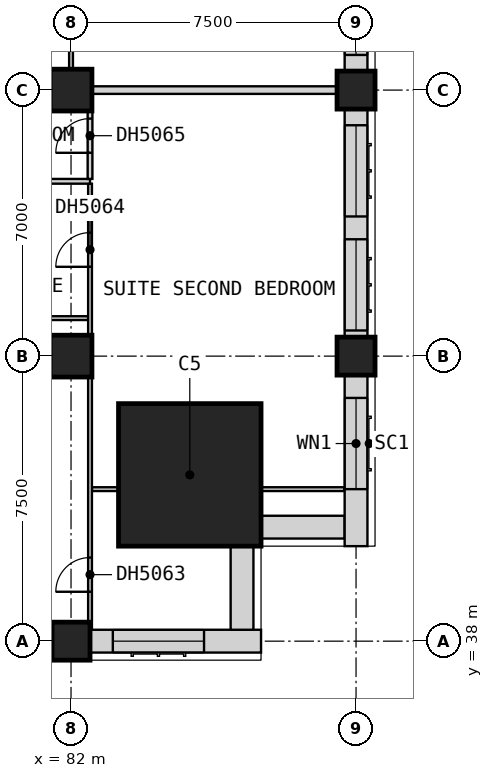
"""IFC4 building model, lengths in metres.
Left out: names, types, materials, properties, quantities, classifications, styles, units other than length and angle.
Written with IfcOpenShell. Run it as: python <this file> out.ifc"""

import sys

from ifc_helpers import new_model, si_unit, direction, frame, frame_2d, origin, origin_2d, place, context, subcontext, project, spatial, rectangle, extrude, element, fill, save


model = new_model("IFC4")
c1 = context("Model", 3, precision=1e-05, world=origin(), true_north=direction((0.0, 1.0)))
c2 = subcontext(c1, "Body", "Model", "MODEL_VIEW")
j1 = project(units=[si_unit("LENGTHUNIT", "METRE"), si_unit("PLANEANGLEUNIT", "RADIAN")], contexts=[c1])
p1 = place(None, origin())
s1 = spatial("IfcSite", under=j1, at=p1, CompositionType="ELEMENT")
p2 = place(p1, origin())
s2 = spatial("IfcBuilding", under=s1, at=p2, CompositionType="ELEMENT")
p3 = place(p2, frame((0.0, 0.0, 93.5)))
s3 = spatial("IfcBuildingStorey", under=s2, at=p3, CompositionType="ELEMENT", Elevation=93.5)
p4 = place(p3, frame((82.0, 38.0, 0.0), z_axis=(0.0, 0.0, 1.0), x_axis=(1.0, 0.0, 0.0)))
e1 = element("IfcColumn", 1, at=p4, inside=s3, PredefinedType="COLUMN", context=c2, shape_type="SweptSolid", body=[
    extrude(rectangle(XDim=1.0, YDim=1.0, at=origin_2d()), origin(), (0.0, 0.0, 1.0), 3.6),
])
for number, where, z_axis, x_axis in (
    (2, (82.0, 45.5, 0.0), (0.0, 0.0, 1.0), (1.0, 0.0, 0.0)),
    (3, (82.0, 52.5, 0.0), (0.0, 0.0, 1.0), (1.0, 0.0, 0.0)),
):
    element("IfcColumn", number, at=place(p3, frame(where, z_axis=z_axis, x_axis=x_axis)), inside=s3, PredefinedType="COLUMN", context=c2, shape_type="SweptSolid", body=[
        extrude(rectangle(XDim=1.1, YDim=1.1, at=origin_2d()), origin(), (0.0, 0.0, 1.0), 3.6),
    ])
for number, where, z_axis, x_axis in (
    (4, (89.5, 45.5, 0.0), (0.0, 0.0, 1.0), (1.0, 0.0, 0.0)),
    (5, (89.5, 52.5, 0.0), (0.0, 0.0, 1.0), (1.0, 0.0, 0.0)),
):
    element("IfcColumn", number, at=place(p3, frame(where, z_axis=z_axis, x_axis=x_axis)), inside=s3, PredefinedType="COLUMN", context=c2, shape_type="SweptSolid", body=[
        extrude(rectangle(XDim=1.0, YDim=1.0, at=origin_2d()), origin(), (0.0, 0.0, 1.0), 3.6),
    ])
p5 = place(p3, frame((85.125, 42.375, 0.0), z_axis=(0.0, 0.0, 1.0), x_axis=(1.0, 0.0, 0.0)))
e6 = element("IfcColumn", 6, at=p5, inside=s3, PredefinedType="COLUMN", context=c2, shape_type="SweptSolid", body=[
    extrude(rectangle(XDim=3.75, YDim=3.75, at=origin_2d()), origin(), (0.0, 0.0, 1.0), 3.6),
])
p6 = place(p3, frame((82.5, 38.0, 0.0), z_axis=(0.0, 0.0, 1.0), x_axis=(1.0, 0.0, 0.0)))
e7 = element("IfcWall", 7, at=p6, inside=s3, PredefinedType="SOLIDWALL", context=c2, shape_type="SweptSolid", body=[
    extrude(rectangle(XDim=4.5, YDim=0.6, at=frame_2d((2.25, 0.0))), origin(), (0.0, 0.0, 1.0), 2.85),
])
p7 = place(p6, frame((0.6, 0.0, 0.8)))
e8 = element("IfcOpeningElement", 8, at=p7, cuts=e7, PredefinedType="OPENING", context=c2, shape_type="SweptSolid", body=[
    extrude(rectangle(XDim=2.4, YDim=1.8, at=frame_2d((1.2, 0.9))), frame((0.0, 0.31, 0.0), z_axis=(0.0, -1.0, 0.0), x_axis=(1.0, 0.0, 0.0)), (0.0, 0.0, 1.0), 0.62),
])
for number, where, z_axis, x_axis in (
    (9, (86.5, 38.3, 0.0), (0.0, 0.0, 1.0), (0.0, 1.0, 0.0)),
    (10, (87.0, 41.0, 0.0), (0.0, 0.0, 1.0), (1.0, 0.0, 0.0)),
):
    element("IfcWall", number, at=place(p3, frame(where, z_axis=z_axis, x_axis=x_axis)), inside=s3, PredefinedType="SOLIDWALL", context=c2, shape_type="SweptSolid", body=[
        extrude(rectangle(XDim=2.2, YDim=0.6, at=frame_2d((1.1, 0.0))), origin(), (0.0, 0.0, 1.0), 3.35),
    ])
p8 = place(p3, frame((89.5, 40.5, 0.0), z_axis=(0.0, 0.0, 1.0), x_axis=(0.0, 1.0, 0.0)))
e11 = element("IfcWall", 11, at=p8, inside=s3, PredefinedType="SOLIDWALL", context=c2, shape_type="SweptSolid", body=[
    extrude(rectangle(XDim=4.5, YDim=0.6, at=frame_2d((2.25, 0.0))), origin(), (0.0, 0.0, 1.0), 2.85),
])
p9 = place(p8, frame((1.5, 0.0, 0.8)))
e12 = element("IfcOpeningElement", 12, at=p9, cuts=e11, PredefinedType="OPENING", context=c2, shape_type="SweptSolid", body=[
    extrude(rectangle(XDim=2.4, YDim=1.8, at=frame_2d((1.2, 0.9))), frame((0.0, 0.31, 0.0), z_axis=(0.0, -1.0, 0.0), x_axis=(1.0, 0.0, 0.0)), (0.0, 0.0, 1.0), 0.62),
])
p10 = place(p3, frame((89.5, 46.0, 0.0), z_axis=(0.0, 0.0, 1.0), x_axis=(0.0, 1.0, 0.0)))
e13 = element("IfcWall", 13, at=p10, inside=s3, PredefinedType="SOLIDWALL", context=c2, shape_type="SweptSolid", body=[
    extrude(rectangle(XDim=6.0, YDim=0.6, at=frame_2d((3.0, 0.0))), origin(), (0.0, 0.0, 1.0), 2.85),
])
p11 = place(p10, frame((0.175, 0.0, 0.8)))
e14 = element("IfcOpeningElement", 14, at=p11, cuts=e13, PredefinedType="OPENING", context=c2, shape_type="SweptSolid", body=[
    extrude(rectangle(XDim=2.4, YDim=1.8, at=frame_2d((1.2, 0.9))), frame((0.0, 0.31, 0.0), z_axis=(0.0, -1.0, 0.0), x_axis=(1.0, 0.0, 0.0)), (0.0, 0.0, 1.0), 0.62),
])
p12 = place(p10, frame((3.175, 0.0, 0.8)))
e15 = element("IfcOpeningElement", 15, at=p12, cuts=e13, PredefinedType="OPENING", context=c2, shape_type="SweptSolid", body=[
    extrude(rectangle(XDim=2.4, YDim=1.8, at=frame_2d((1.2, 0.9))), frame((0.0, 0.31, 0.0), z_axis=(0.0, -1.0, 0.0), x_axis=(1.0, 0.0, 0.0)), (0.0, 0.0, 1.0), 0.62),
])
p13 = place(p3, frame((89.5, 53.0, 0.0), z_axis=(0.0, 0.0, 1.0), x_axis=(0.0, 1.0, 0.0)))
e16 = element("IfcWall", 16, at=p13, inside=s3, PredefinedType="SOLIDWALL", context=c2, shape_type="SweptSolid", body=[
    extrude(rectangle(XDim=6.5, YDim=0.6, at=frame_2d((3.25, 0.0))), origin(), (0.0, 0.0, 1.0), 2.85),
])
p14 = place(p13, frame((0.425, 0.0, 0.8)))
e17 = element("IfcOpeningElement", 17, at=p14, cuts=e16, PredefinedType="OPENING", context=c2, shape_type="SweptSolid", body=[
    extrude(rectangle(XDim=2.4, YDim=1.8, at=frame_2d((1.2, 0.9))), frame((0.0, 0.31, 0.0), z_axis=(0.0, -1.0, 0.0), x_axis=(1.0, 0.0, 0.0)), (0.0, 0.0, 1.0), 0.62),
])
p15 = place(p13, frame((3.675, 0.0, 0.8)))
e18 = element("IfcOpeningElement", 18, at=p15, cuts=e16, PredefinedType="OPENING", context=c2, shape_type="SweptSolid", body=[
    extrude(rectangle(XDim=2.4, YDim=1.8, at=frame_2d((1.2, 0.9))), frame((0.0, 0.31, 0.0), z_axis=(0.0, -1.0, 0.0), x_axis=(1.0, 0.0, 0.0)), (0.0, 0.0, 1.0), 0.62),
])
p16 = place(p3, frame((77.475, 52.5, 0.0), z_axis=(0.0, 0.0, 1.0), x_axis=(1.0, 0.0, 0.0)))
e19 = element("IfcWall", 19, at=p16, inside=s3, PredefinedType="PARTITIONING", context=c2, shape_type="SweptSolid", body=[
    extrude(rectangle(XDim=12.525, YDim=0.2, at=frame_2d((6.262, 0.0))), origin(), (0.0, 0.0, 1.0), 3.35),
])
p17 = place(p3, frame((82.55, 42.0, 0.0), z_axis=(0.0, 0.0, 1.0), x_axis=(1.0, 0.0, 0.0)))
e20 = element("IfcWall", 20, at=p17, inside=s3, PredefinedType="PARTITIONING", context=c2, shape_type="SweptSolid", body=[
    extrude(rectangle(XDim=6.64, YDim=0.1, at=frame_2d((3.32, 0.0))), origin(), (0.0, 0.0, 1.0), 3.35),
])
p18 = place(p3, frame((75.1, 46.5, 0.0), z_axis=(0.0, 0.0, 1.0), x_axis=(1.0, 0.0, 0.0)))
e21 = element("IfcWall", 21, at=p18, inside=s3, PredefinedType="PARTITIONING", context=c2, shape_type="SweptSolid", body=[
    extrude(rectangle(XDim=7.35, YDim=0.1, at=frame_2d((3.675, 0.0))), origin(), (0.0, 0.0, 1.0), 3.35),
])
p19 = place(p18, frame((0.65, 0.0, 0.0)))
e22 = element("IfcOpeningElement", 22, at=p19, cuts=e21, PredefinedType="OPENING", context=c2, shape_type="SweptSolid", body=[
    extrude(rectangle(XDim=0.9, YDim=2.1, at=frame_2d((0.45, 1.05))), frame((0.0, 0.06, 0.0), z_axis=(0.0, -1.0, 0.0), x_axis=(1.0, 0.0, 0.0)), (0.0, 0.0, 1.0), 0.12),
])
p20 = place(p3, frame((82.0, 52.6, 0.0), z_axis=(0.0, 0.0, 1.0), x_axis=(0.0, 1.0, 0.0)))
e23 = element("IfcWall", 23, at=p20, inside=s3, PredefinedType="PARTITIONING", context=c2, shape_type="SweptSolid", body=[
    extrude(rectangle(XDim=4.337, YDim=0.1, at=frame_2d((2.169, 0.0))), origin(), (0.0, 0.0, 1.0), 3.35),
])
p21 = place(p20, frame((1.7, 0.0, 0.0)))
e24 = element("IfcOpeningElement", 24, at=p21, cuts=e23, PredefinedType="OPENING", context=c2, shape_type="SweptSolid", body=[
    extrude(rectangle(XDim=0.9, YDim=2.1, at=frame_2d((0.45, 1.05))), frame((0.0, 0.06, 0.0), z_axis=(0.0, -1.0, 0.0), x_axis=(1.0, 0.0, 0.0)), (0.0, 0.0, 1.0), 0.12),
])
p22 = place(p3, frame((82.5, 38.31, 0.0), z_axis=(0.0, 0.0, 1.0), x_axis=(0.0, 1.0, 0.0)))
e25 = element("IfcWall", 25, at=p22, inside=s3, PredefinedType="PARTITIONING", context=c2, shape_type="SweptSolid", body=[
    extrude(rectangle(XDim=11.728, YDim=0.1, at=frame_2d((5.864, 0.0))), origin(), (0.0, 0.0, 1.0), 3.35),
])
p23 = place(p22, frame((0.99, 0.0, 0.0)))
e26 = element("IfcOpeningElement", 26, at=p23, cuts=e25, PredefinedType="OPENING", context=c2, shape_type="SweptSolid", body=[
    extrude(rectangle(XDim=0.9, YDim=2.1, at=frame_2d((0.45, 1.05))), frame((0.0, 0.06, 0.0), z_axis=(0.0, -1.0, 0.0), x_axis=(1.0, 0.0, 0.0)), (0.0, 0.0, 1.0), 0.12),
])
p24 = place(p22, frame((9.54, 0.0, 0.0)))
e27 = element("IfcOpeningElement", 27, at=p24, cuts=e25, PredefinedType="OPENING", context=c2, shape_type="SweptSolid", body=[
    extrude(rectangle(XDim=0.9, YDim=2.1, at=frame_2d((0.45, 1.05))), frame((0.0, 0.06, 0.0), z_axis=(0.0, -1.0, 0.0), x_axis=(1.0, 0.0, 0.0)), (0.0, 0.0, 1.0), 0.12),
])
p25 = place(p3, frame((77.475, 50.1, 0.0), z_axis=(0.0, 0.0, 1.0), x_axis=(1.0, 0.0, 0.0)))
e28 = element("IfcWall", 28, at=p25, inside=s3, PredefinedType="PARTITIONING", context=c2, shape_type="SweptSolid", body=[
    extrude(rectangle(XDim=5.025, YDim=0.125, at=frame_2d((2.512, 0.0))), origin(), (0.0, 0.0, 1.0), 3.35),
])
p26 = place(p3, frame((82.5, 50.163, 0.0), z_axis=(0.0, 0.0, 1.0), x_axis=(0.0, 1.0, 0.0)))
e29 = element("IfcWall", 29, at=p26, inside=s3, PredefinedType="PARTITIONING", context=c2, shape_type="SweptSolid", body=[
    extrude(rectangle(XDim=2.237, YDim=0.125, at=frame_2d((1.119, 0.0))), origin(), (0.0, 0.0, 1.0), 3.35),
])
p27 = place(p26, frame((0.688, 0.0, 0.0)))
e30 = element("IfcOpeningElement", 30, at=p27, cuts=e29, PredefinedType="OPENING", context=c2, shape_type="SweptSolid", body=[
    extrude(rectangle(XDim=0.9, YDim=2.1, at=frame_2d((0.45, 1.05))), frame((0.0, 0.073, 0.0), z_axis=(0.0, -1.0, 0.0), x_axis=(1.0, 0.0, 0.0)), (0.0, 0.0, 1.0), 0.145),
])
p28 = place(p7, origin())
e31 = element("IfcWindow", 31, at=p28, inside=s3, PartitioningType="SINGLE_PANEL", PredefinedType="WINDOW", context=c2, shape_type="SweptSolid", body=[
    extrude(rectangle(XDim=2.4, YDim=1.8, at=frame_2d((1.2, 0.9))), frame((0.0, -0.07, 0.0), z_axis=(0.0, -1.0, 0.0), x_axis=(1.0, 0.0, 0.0)), (0.0, 0.0, 1.0), 0.06),
])
fill(e8, e31)
p29 = place(p9, origin())
e32 = element("IfcWindow", 32, at=p29, inside=s3, PartitioningType="SINGLE_PANEL", PredefinedType="WINDOW", context=c2, shape_type="SweptSolid", body=[
    extrude(rectangle(XDim=2.4, YDim=1.8, at=frame_2d((1.2, 0.9))), frame((0.0, -0.07, 0.0), z_axis=(0.0, -1.0, 0.0), x_axis=(1.0, 0.0, 0.0)), (0.0, 0.0, 1.0), 0.06),
])
fill(e12, e32)
p30 = place(p11, origin())
e33 = element("IfcWindow", 33, at=p30, inside=s3, PartitioningType="SINGLE_PANEL", PredefinedType="WINDOW", context=c2, shape_type="SweptSolid", body=[
    extrude(rectangle(XDim=2.4, YDim=1.8, at=frame_2d((1.2, 0.9))), frame((0.0, -0.07, 0.0), z_axis=(0.0, -1.0, 0.0), x_axis=(1.0, 0.0, 0.0)), (0.0, 0.0, 1.0), 0.06),
])
fill(e14, e33)
p31 = place(p12, origin())
e34 = element("IfcWindow", 34, at=p31, inside=s3, PartitioningType="SINGLE_PANEL", PredefinedType="WINDOW", context=c2, shape_type="SweptSolid", body=[
    extrude(rectangle(XDim=2.4, YDim=1.8, at=frame_2d((1.2, 0.9))), frame((0.0, -0.07, 0.0), z_axis=(0.0, -1.0, 0.0), x_axis=(1.0, 0.0, 0.0)), (0.0, 0.0, 1.0), 0.06),
])
fill(e15, e34)
p32 = place(p14, origin())
e35 = element("IfcWindow", 35, at=p32, inside=s3, PartitioningType="SINGLE_PANEL", PredefinedType="WINDOW", context=c2, shape_type="SweptSolid", body=[
    extrude(rectangle(XDim=2.4, YDim=1.8, at=frame_2d((1.2, 0.9))), frame((0.0, -0.07, 0.0), z_axis=(0.0, -1.0, 0.0), x_axis=(1.0, 0.0, 0.0)), (0.0, 0.0, 1.0), 0.06),
])
fill(e17, e35)
p33 = place(p23, origin())
e36 = element("IfcDoor", 36, at=p33, inside=s3, OperationType="SINGLE_SWING_LEFT", PredefinedType="DOOR", context=c2, shape_type="SweptSolid", body=[
    extrude(rectangle(XDim=0.9, YDim=2.1, at=frame_2d((0.45, 1.05))), frame((0.0, 0.025, 0.0), z_axis=(0.0, -1.0, 0.0), x_axis=(1.0, 0.0, 0.0)), (0.0, 0.0, 1.0), 0.05),
])
fill(e26, e36)
p34 = place(p24, origin())
e37 = element("IfcDoor", 37, at=p34, inside=s3, OperationType="SINGLE_SWING_RIGHT", PredefinedType="DOOR", context=c2, shape_type="SweptSolid", body=[
    extrude(rectangle(XDim=0.9, YDim=2.1, at=frame_2d((0.45, 1.05))), frame((0.0, 0.025, 0.0), z_axis=(0.0, -1.0, 0.0), x_axis=(1.0, 0.0, 0.0)), (0.0, 0.0, 1.0), 0.05),
])
fill(e27, e37)
p35 = place(p27, origin())
e38 = element("IfcDoor", 38, at=p35, inside=s3, OperationType="SINGLE_SWING_LEFT", PredefinedType="DOOR", context=c2, shape_type="SweptSolid", body=[
    extrude(rectangle(XDim=0.9, YDim=2.1, at=frame_2d((0.45, 1.05))), frame((0.0, 0.025, 0.0), z_axis=(0.0, -1.0, 0.0), x_axis=(1.0, 0.0, 0.0)), (0.0, 0.0, 1.0), 0.05),
])
fill(e30, e38)
save(model, sys.argv[1])
